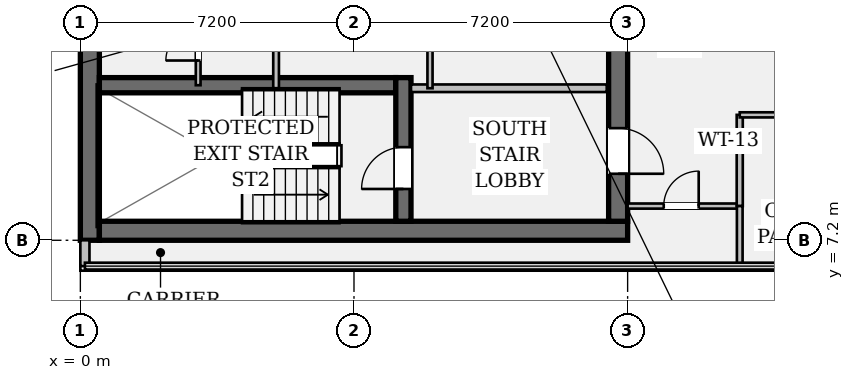
"""IFC4 building model, lengths in metres.
Left out: names, types, materials, properties, quantities, classifications, styles, units other than length and angle.
Written with IfcOpenShell. Run it as: python <this file> out.ifc"""

import sys

from ifc_helpers import new_model, si_unit, direction, frame, frame_2d, origin, place, context, subcontext, project, spatial, rectangle, extrude, element, fill, save


model = new_model("IFC4")
c1 = context("Model", 3, precision=1e-05, world=origin(), true_north=direction((0.0, 1.0)))
c2 = subcontext(c1, "Body", "Model", "MODEL_VIEW")
j1 = project(units=[si_unit("LENGTHUNIT", "METRE"), si_unit("PLANEANGLEUNIT", "RADIAN")], contexts=[c1])
p1 = place(None, origin())
s1 = spatial("IfcSite", under=j1, at=p1, CompositionType="ELEMENT")
p2 = place(p1, origin())
s2 = spatial("IfcBuilding", under=s1, at=p2, CompositionType="ELEMENT")
p3 = place(p2, frame((0.0, 0.0, 286.65)))
s3 = spatial("IfcBuildingStorey", under=s2, at=p3, CompositionType="ELEMENT", Elevation=286.65)
p4 = place(p3, frame((0.25, 7.2, 0.0), z_axis=(0.0, 0.0, 1.0), x_axis=(0.0, 1.0, 0.0)))
e1 = element("IfcWall", 1, at=p4, inside=s3, PredefinedType="SHEAR", context=c2, shape_type="SweptSolid", body=[
    extrude(rectangle(XDim=28.8, YDim=0.5, at=frame_2d((14.4, 0.0))), origin(), (0.0, 0.0, 1.0), 3.24),
])
p5 = place(p3, frame((0.5, 7.45, 0.0), z_axis=(0.0, 0.0, 1.0), x_axis=(1.0, 0.0, 0.0)))
e2 = element("IfcWall", 2, at=p5, inside=s3, PredefinedType="SHEAR", context=c2, shape_type="SweptSolid", body=[
    extrude(rectangle(XDim=13.9, YDim=0.5, at=frame_2d((6.95, 0.0))), origin(), (0.0, 0.0, 1.0), 3.24),
])
p6 = place(p3, frame((14.15, 35.5, 0.0), z_axis=(0.0, 0.0, 1.0), x_axis=(0.0, -1.0, 0.0)))
e3 = element("IfcWall", 3, at=p6, inside=s3, PredefinedType="SHEAR", context=c2, shape_type="SweptSolid", body=[
    extrude(rectangle(XDim=27.8, YDim=0.5, at=frame_2d((13.9, 0.0))), origin(), (0.0, 0.0, 1.0), 3.24),
])
p7 = place(p6, frame((1.4, 0.0, 0.0)))
e4 = element("IfcOpeningElement", 4, at=p7, cuts=e3, PredefinedType="OPENING", context=c2, shape_type="SweptSolid", body=[
    extrude(rectangle(XDim=1.2, YDim=2.15, at=frame_2d((0.6, 1.075))), frame((0.0, 0.262, 0.0), z_axis=(0.0, -1.0, 0.0), x_axis=(1.0, 0.0, 0.0)), (0.0, 0.0, 1.0), 0.524),
])
p8 = place(p6, frame((25.35, 0.0, 0.0)))
e5 = element("IfcOpeningElement", 5, at=p8, cuts=e3, PredefinedType="OPENING", context=c2, shape_type="SweptSolid", body=[
    extrude(rectangle(XDim=1.2, YDim=2.15, at=frame_2d((0.6, 1.075))), frame((0.0, 0.262, 0.0), z_axis=(0.0, -1.0, 0.0), x_axis=(1.0, 0.0, 0.0)), (0.0, 0.0, 1.0), 0.524),
])
p9 = place(p6, frame((14.7, 0.0, 0.0)))
e6 = element("IfcOpeningElement", 6, at=p9, cuts=e3, PredefinedType="OPENING", context=c2, shape_type="SweptSolid", body=[
    extrude(rectangle(XDim=1.6, YDim=2.2, at=frame_2d((0.8, 1.1))), frame((0.0, 0.262, 0.0), z_axis=(0.0, -1.0, 0.0), x_axis=(1.0, 0.0, 0.0)), (0.0, 0.0, 1.0), 0.524),
])
p10 = place(p3, frame((0.5, 11.28, 0.0), z_axis=(0.0, 0.0, 1.0), x_axis=(1.0, 0.0, 0.0)))
e7 = element("IfcWall", 7, at=p10, inside=s3, PredefinedType="SHEAR", context=c2, shape_type="SweptSolid", body=[
    extrude(rectangle(XDim=7.8, YDim=0.4, at=frame_2d((3.9, 0.0))), origin(), (0.0, 0.0, 1.0), 3.24),
])
p11 = place(p3, frame((8.5, 7.7, 0.0), z_axis=(0.0, 0.0, 1.0), x_axis=(0.0, 1.0, 0.0)))
e8 = element("IfcWall", 8, at=p11, inside=s3, PredefinedType="SHEAR", context=c2, shape_type="SweptSolid", body=[
    extrude(rectangle(XDim=3.78, YDim=0.4, at=frame_2d((1.89, 0.0))), origin(), (0.0, 0.0, 1.0), 3.24),
])
p12 = place(p11, frame((0.85, 0.0, 0.0)))
e9 = element("IfcOpeningElement", 9, at=p12, cuts=e8, PredefinedType="OPENING", context=c2, shape_type="SweptSolid", body=[
    extrude(rectangle(XDim=1.1, YDim=2.15, at=frame_2d((0.55, 1.075))), frame((0.0, 0.212, 0.0), z_axis=(0.0, -1.0, 0.0), x_axis=(1.0, 0.0, 0.0)), (0.0, 0.0, 1.0), 0.424),
])
p13 = place(p3, frame((0.12, 6.52, 0.0), z_axis=(0.0, 0.0, 1.0), x_axis=(0.0, 1.0, 0.0)))
e10 = element("IfcWall", 10, at=p13, inside=s3, PredefinedType="STANDARD", context=c2, shape_type="SweptSolid", body=[
    extrude(rectangle(XDim=0.68, YDim=0.24, at=frame_2d((0.34, 0.0))), origin(), (0.0, 0.0, 1.0), 3.24),
])
p14 = place(p3, frame((8.7, 11.2, 0.0), z_axis=(0.0, 0.0, 1.0), x_axis=(1.0, 0.0, 0.0)))
e11 = element("IfcWall", 11, at=p14, inside=s3, PredefinedType="PARTITIONING", context=c2, shape_type="SweptSolid", body=[
    extrude(rectangle(XDim=5.15, YDim=0.2, at=frame_2d((2.575, 0.0))), origin(), (0.0, 0.0, 1.0), 3.24),
])
p15 = place(p3, frame((5.15, 11.2, 0.0), z_axis=(0.0, 0.0, 1.0), x_axis=(0.0, 1.0, 0.0)))
e12 = element("IfcWall", 12, at=p15, inside=s3, PredefinedType="PARTITIONING", context=c2, shape_type="SweptSolid", body=[
    extrude(rectangle(XDim=6.6, YDim=0.15, at=frame_2d((3.3, 0.0))), origin(), (0.0, 0.0, 1.0), 3.24),
])
p16 = place(p3, frame((9.2, 11.2, 0.0), z_axis=(0.0, 0.0, 1.0), x_axis=(0.0, 1.0, 0.0)))
e13 = element("IfcWall", 13, at=p16, inside=s3, PredefinedType="PARTITIONING", context=c2, shape_type="SweptSolid", body=[
    extrude(rectangle(XDim=6.6, YDim=0.135, at=frame_2d((3.3, 0.0))), origin(), (0.0, 0.0, 1.0), 3.24),
])
p17 = place(p3, frame((3.1, 11.28, 0.0), z_axis=(0.0, 0.0, 1.0), x_axis=(0.0, 1.0, 0.0)))
e14 = element("IfcWall", 14, at=p17, inside=s3, PredefinedType="PARTITIONING", context=c2, shape_type="SweptSolid", body=[
    extrude(rectangle(XDim=4.42, YDim=0.125, at=frame_2d((2.21, 0.0))), origin(), (0.0, 0.0, 1.0), 3.24),
])
p18 = place(p17, frame((0.65, 0.0, 0.0)))
e15 = element("IfcOpeningElement", 15, at=p18, cuts=e14, PredefinedType="OPENING", context=c2, shape_type="SweptSolid", body=[
    extrude(rectangle(XDim=0.85, YDim=2.15, at=frame_2d((0.425, 1.075))), frame((0.0, 0.074, 0.0), z_axis=(0.0, -1.0, 0.0), x_axis=(1.0, 0.0, 0.0)), (0.0, 0.0, 1.0), 0.149),
])
p19 = place(p17, frame((2.75, 0.0, 0.0)))
e16 = element("IfcOpeningElement", 16, at=p19, cuts=e14, PredefinedType="OPENING", context=c2, shape_type="SweptSolid", body=[
    extrude(rectangle(XDim=0.85, YDim=2.15, at=frame_2d((0.425, 1.075))), frame((0.0, 0.074, 0.0), z_axis=(0.0, -1.0, 0.0), x_axis=(1.0, 0.0, 0.0)), (0.0, 0.0, 1.0), 0.149),
])
p20 = place(p3, frame((14.4, 8.1, 0.0), z_axis=(0.0, 0.0, 1.0), x_axis=(1.0, 0.0, 0.0)))
e17 = element("IfcWall", 17, at=p20, inside=s3, PredefinedType="PARTITIONING", context=c2, shape_type="SweptSolid", body=[
    extrude(rectangle(XDim=2.95, YDim=0.135, at=frame_2d((1.475, 0.0))), origin(), (0.0, 0.0, 1.0), 3.24),
])
p21 = place(p20, frame((0.95, 0.0, 0.0)))
e18 = element("IfcOpeningElement", 18, at=p21, cuts=e17, PredefinedType="OPENING", context=c2, shape_type="SweptSolid", body=[
    extrude(rectangle(XDim=0.92, YDim=2.15, at=frame_2d((0.46, 1.075))), frame((0.0, 0.08, 0.0), z_axis=(0.0, -1.0, 0.0), x_axis=(1.0, 0.0, 0.0)), (0.0, 0.0, 1.0), 0.159),
])
p22 = place(p3, frame((17.35, 8.1, 0.0), z_axis=(0.0, 0.0, 1.0), x_axis=(0.0, 1.0, 0.0)))
e19 = element("IfcWall", 19, at=p22, inside=s3, PredefinedType="PARTITIONING", context=c2, shape_type="SweptSolid", body=[
    extrude(rectangle(XDim=2.4, YDim=0.16, at=frame_2d((1.2, 0.0))), origin(), (0.0, 0.0, 1.0), 3.24),
])
p23 = place(p3, frame((17.35, 10.5, 0.0), z_axis=(0.0, 0.0, 1.0), x_axis=(1.0, 0.0, 0.0)))
e20 = element("IfcWall", 20, at=p23, inside=s3, PredefinedType="PARTITIONING", context=c2, shape_type="SweptSolid", body=[
    extrude(rectangle(XDim=12.6, YDim=0.135, at=frame_2d((6.3, 0.0))), origin(), (0.0, 0.0, 1.0), 2.676),
])
p24 = place(p23, frame((1.92, 0.0, 0.0)))
e21 = element("IfcOpeningElement", 21, at=p24, cuts=e20, PredefinedType="OPENING", context=c2, shape_type="SweptSolid", body=[
    extrude(rectangle(XDim=0.92, YDim=2.15, at=frame_2d((0.46, 1.075))), frame((0.0, 0.08, 0.0), z_axis=(0.0, -1.0, 0.0), x_axis=(1.0, 0.0, 0.0)), (0.0, 0.0, 1.0), 0.159),
])
p25 = place(p23, frame((6.55, 0.0, 0.0)))
e22 = element("IfcOpeningElement", 22, at=p25, cuts=e20, PredefinedType="OPENING", context=c2, shape_type="SweptSolid", body=[
    extrude(rectangle(XDim=0.92, YDim=2.15, at=frame_2d((0.46, 1.075))), frame((0.0, 0.08, 0.0), z_axis=(0.0, -1.0, 0.0), x_axis=(1.0, 0.0, 0.0)), (0.0, 0.0, 1.0), 0.159),
])
p26 = place(p23, frame((10.42, 0.0, 0.0)))
e23 = element("IfcOpeningElement", 23, at=p26, cuts=e20, PredefinedType="OPENING", context=c2, shape_type="SweptSolid", body=[
    extrude(rectangle(XDim=0.92, YDim=2.15, at=frame_2d((0.46, 1.075))), frame((0.0, 0.08, 0.0), z_axis=(0.0, -1.0, 0.0), x_axis=(1.0, 0.0, 0.0)), (0.0, 0.0, 1.0), 0.159),
])
p27 = place(p3, frame((17.35, 6.52, 0.0), z_axis=(0.0, 0.0, 1.0), x_axis=(0.0, 1.0, 0.0)))
e24 = element("IfcWall", 24, at=p27, inside=s3, PredefinedType="PARTITIONING", context=c2, shape_type="SweptSolid", body=[
    extrude(rectangle(XDim=1.58, YDim=0.15, at=frame_2d((0.79, 0.0))), origin(), (0.0, 0.0, 1.0), 3.24),
])
p28 = place(p12, origin())
e25 = element("IfcDoor", 25, at=p28, inside=s3, OperationType="SINGLE_SWING_LEFT", PredefinedType="DOOR", context=c2, shape_type="SweptSolid", body=[
    extrude(rectangle(XDim=1.1, YDim=2.15, at=frame_2d((0.55, 1.075))), frame((0.0, 0.025, 0.0), z_axis=(0.0, -1.0, 0.0), x_axis=(1.0, 0.0, 0.0)), (0.0, 0.0, 1.0), 0.05),
])
fill(e9, e25)
p29 = place(p8, origin())
e26 = element("IfcDoor", 26, at=p29, inside=s3, OperationType="SINGLE_SWING_RIGHT", PredefinedType="DOOR", context=c2, shape_type="SweptSolid", body=[
    extrude(rectangle(XDim=1.2, YDim=2.15, at=frame_2d((0.6, 1.075))), frame((0.0, 0.025, 0.0), z_axis=(0.0, -1.0, 0.0), x_axis=(1.0, 0.0, 0.0)), (0.0, 0.0, 1.0), 0.05),
])
fill(e5, e26)
p30 = place(p18, origin())
e27 = element("IfcDoor", 27, at=p30, inside=s3, OperationType="SINGLE_SWING_LEFT", PredefinedType="DOOR", context=c2, shape_type="SweptSolid", body=[
    extrude(rectangle(XDim=0.85, YDim=2.15, at=frame_2d((0.425, 1.075))), frame((0.0, 0.025, 0.0), z_axis=(0.0, -1.0, 0.0), x_axis=(1.0, 0.0, 0.0)), (0.0, 0.0, 1.0), 0.05),
])
fill(e15, e27)
p31 = place(p21, origin())
e28 = element("IfcDoor", 28, at=p31, inside=s3, OperationType="SINGLE_SWING_RIGHT", PredefinedType="DOOR", context=c2, shape_type="SweptSolid", body=[
    extrude(rectangle(XDim=0.92, YDim=2.15, at=frame_2d((0.46, 1.075))), frame((0.0, 0.025, 0.0), z_axis=(0.0, -1.0, 0.0), x_axis=(1.0, 0.0, 0.0)), (0.0, 0.0, 1.0), 0.05),
])
fill(e18, e28)
save(model, sys.argv[1])
